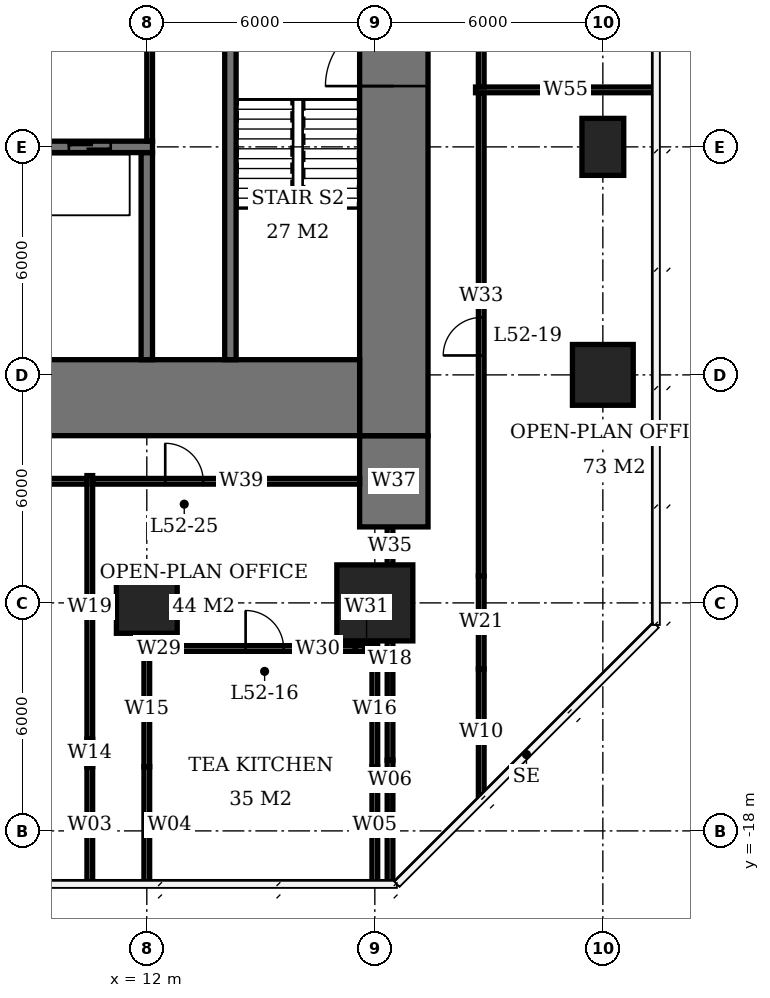
"""IFC4 building model, lengths in metres.
Left out: names, types, materials, properties, quantities, classifications, styles, units other than length and angle.
Written with IfcOpenShell. Run it as: python <this file> out.ifc"""

import sys

from ifc_helpers import new_model, si_unit, direction, frame, frame_2d, origin, origin_2d, place, context, subcontext, project, spatial, rectangle, extrude, element, fill, save


model = new_model("IFC4")
c1 = context("Model", 3, precision=1e-05, world=origin(), true_north=direction((0.0, 1.0)))
c2 = subcontext(c1, "Body", "Model", "MODEL_VIEW")
j1 = project(units=[si_unit("LENGTHUNIT", "METRE"), si_unit("PLANEANGLEUNIT", "RADIAN")], contexts=[c1])
p1 = place(None, origin())
s1 = spatial("IfcSite", under=j1, at=p1, CompositionType="ELEMENT")
p2 = place(p1, origin())
s2 = spatial("IfcBuilding", under=s1, at=p2, CompositionType="ELEMENT")
p3 = place(p2, frame((0.0, 0.0, 212.3)))
s3 = spatial("IfcBuildingStorey", under=s2, at=p3, CompositionType="ELEMENT", Elevation=212.3)
p4 = place(p3, frame((12.0, -12.0, 0.0), z_axis=(0.0, 0.0, 1.0), x_axis=(1.0, 0.0, 0.0)))
e1 = element("IfcColumn", 1, at=p4, inside=s3, PredefinedType="COLUMN", context=c2, shape_type="SweptSolid", body=[
    extrude(rectangle(XDim=1.6, YDim=1.6, at=origin_2d()), origin(), (0.0, 0.0, 1.0), 3.9),
])
p5 = place(p3, frame((18.0, -12.0, 0.0), z_axis=(0.0, 0.0, 1.0), x_axis=(1.0, 0.0, 0.0)))
e2 = element("IfcColumn", 2, at=p5, inside=s3, PredefinedType="COLUMN", context=c2, shape_type="SweptSolid", body=[
    extrude(rectangle(XDim=2.0, YDim=2.0, at=origin_2d()), origin(), (0.0, 0.0, 1.0), 3.9),
])
p6 = place(p3, frame((24.0, -6.0, 0.0), z_axis=(0.0, 0.0, 1.0), x_axis=(1.0, 0.0, 0.0)))
e3 = element("IfcColumn", 3, at=p6, inside=s3, PredefinedType="COLUMN", context=c2, shape_type="SweptSolid", body=[
    extrude(rectangle(XDim=1.6, YDim=1.6, at=origin_2d()), origin(), (0.0, 0.0, 1.0), 3.9),
])
p7 = place(p3, frame((24.0, 0.0, 0.0), z_axis=(0.0, 0.0, 1.0), x_axis=(0.0, 1.0, 0.0)))
e4 = element("IfcColumn", 4, at=p7, inside=s3, PredefinedType="COLUMN", context=c2, shape_type="SweptSolid", body=[
    extrude(rectangle(XDim=1.5, YDim=1.1, at=origin_2d()), origin(), (0.0, 0.0, 1.0), 3.9),
])
p8 = place(p3, frame((-5.6, -6.6, 0.0), z_axis=(0.0, 0.0, 1.0), x_axis=(1.0, 0.0, 0.0)))
e5 = element("IfcWall", 5, at=p8, inside=s3, PredefinedType="SHEAR", context=c2, shape_type="SweptSolid", body=[
    extrude(rectangle(XDim=23.2, YDim=2.0, at=frame_2d((11.6, 0.0))), origin(), (0.0, 0.0, 1.0), 3.9),
])
p9 = place(p3, frame((18.5, -7.6, 0.0), z_axis=(0.0, 0.0, 1.0), x_axis=(0.0, 1.0, 0.0)))
e6 = element("IfcWall", 6, at=p9, inside=s3, PredefinedType="SHEAR", context=c2, shape_type="SweptSolid", body=[
    extrude(rectangle(XDim=21.2, YDim=1.8, at=frame_2d((10.6, 0.0))), origin(), (0.0, 0.0, 1.0), 3.9),
])
p10 = place(p9, frame((9.2, 0.0, 0.0)))
e7 = element("IfcOpeningElement", 7, at=p10, cuts=e6, PredefinedType="OPENING", context=c2, shape_type="SweptSolid", body=[
    extrude(rectangle(XDim=1.8, YDim=2.4, at=frame_2d((0.9, 1.2))), frame((0.0, 0.91, 0.0), z_axis=(0.0, -1.0, 0.0), x_axis=(1.0, 0.0, 0.0)), (0.0, 0.0, 1.0), 1.82),
])
p11 = place(p3, frame((18.5, -10.0, 0.0), z_axis=(0.0, 0.0, 1.0), x_axis=(0.0, 1.0, 0.0)))
e8 = element("IfcWall", 8, at=p11, inside=s3, PredefinedType="SHEAR", context=c2, shape_type="SweptSolid", body=[
    extrude(rectangle(XDim=2.4, YDim=1.8, at=frame_2d((1.2, 0.0))), origin(), (0.0, 0.0, 1.0), 3.9),
])
p12 = place(p3, frame((-5.6, 0.0, 0.0), z_axis=(0.0, 0.0, 1.0), x_axis=(1.0, 0.0, 0.0)))
e9 = element("IfcWall", 9, at=p12, inside=s3, PredefinedType="SHEAR", context=c2, shape_type="SweptSolid", body=[
    extrude(rectangle(XDim=17.75, YDim=0.3, at=frame_2d((8.875, 0.0))), origin(), (0.0, 0.0, 1.0), 3.9),
])
p13 = place(p12, frame((0.6, 0.0, 0.0)))
e10 = element("IfcOpeningElement", 10, at=p13, cuts=e9, PredefinedType="OPENING", context=c2, shape_type="SweptSolid", body=[
    extrude(rectangle(XDim=0.9, YDim=2.1, at=frame_2d((0.45, 1.05))), frame((0.0, 0.16, 0.0), z_axis=(0.0, -1.0, 0.0), x_axis=(1.0, 0.0, 0.0)), (0.0, 0.0, 1.0), 0.32),
])
p14 = place(p12, frame((3.7, 0.0, 0.0)))
e11 = element("IfcOpeningElement", 11, at=p14, cuts=e9, PredefinedType="OPENING", context=c2, shape_type="SweptSolid", body=[
    extrude(rectangle(XDim=1.0, YDim=2.1, at=frame_2d((0.5, 1.05))), frame((0.0, 0.16, 0.0), z_axis=(0.0, -1.0, 0.0), x_axis=(1.0, 0.0, 0.0)), (0.0, 0.0, 1.0), 0.32),
])
p15 = place(p12, frame((9.6, 0.0, 0.0)))
e12 = element("IfcOpeningElement", 12, at=p15, cuts=e9, PredefinedType="OPENING", context=c2, shape_type="SweptSolid", body=[
    extrude(rectangle(XDim=1.0, YDim=2.1, at=frame_2d((0.5, 1.05))), frame((0.0, 0.16, 0.0), z_axis=(0.0, -1.0, 0.0), x_axis=(1.0, 0.0, 0.0)), (0.0, 0.0, 1.0), 0.32),
])
p16 = place(p12, frame((12.55, 0.0, 0.0)))
e13 = element("IfcOpeningElement", 13, at=p16, cuts=e9, PredefinedType="OPENING", context=c2, shape_type="SweptSolid", body=[
    extrude(rectangle(XDim=1.1, YDim=2.1, at=frame_2d((0.55, 1.05))), frame((0.0, 0.16, 0.0), z_axis=(0.0, -1.0, 0.0), x_axis=(1.0, 0.0, 0.0)), (0.0, 0.0, 1.0), 0.32),
])
p17 = place(p12, frame((15.55, 0.0, 0.0)))
e14 = element("IfcOpeningElement", 14, at=p17, cuts=e9, PredefinedType="OPENING", context=c2, shape_type="SweptSolid", body=[
    extrude(rectangle(XDim=1.1, YDim=2.1, at=frame_2d((0.55, 1.05))), frame((0.0, 0.16, 0.0), z_axis=(0.0, -1.0, 0.0), x_axis=(1.0, 0.0, 0.0)), (0.0, 0.0, 1.0), 0.32),
])
p18 = place(p3, frame((12.0, -5.6, 0.0), z_axis=(0.0, 0.0, 1.0), x_axis=(0.0, 1.0, 0.0)))
e15 = element("IfcWall", 15, at=p18, inside=s3, PredefinedType="SHEAR", context=c2, shape_type="SweptSolid", body=[
    extrude(rectangle(XDim=5.45, YDim=0.3, at=frame_2d((2.725, 0.0))), origin(), (0.0, 0.0, 1.0), 3.9),
])
p19 = place(p3, frame((14.2, -5.6, 0.0), z_axis=(0.0, 0.0, 1.0), x_axis=(0.0, 1.0, 0.0)))
e16 = element("IfcWall", 16, at=p19, inside=s3, PredefinedType="SHEAR", context=c2, shape_type="SweptSolid", body=[
    extrude(rectangle(XDim=8.45, YDim=0.3, at=frame_2d((4.225, 0.0))), origin(), (0.0, 0.0, 1.0), 3.9),
])
p20 = place(p3, frame((11.925, -13.2, 0.0), z_axis=(0.0, 0.0, 1.0), x_axis=(1.0, 0.0, 0.0)))
e17 = element("IfcWall", 17, at=p20, inside=s3, PredefinedType="PARTITIONING", context=c2, shape_type="SweptSolid", body=[
    extrude(rectangle(XDim=0.785, YDim=0.15, at=frame_2d((0.393, 0.0))), origin(), (0.0, 0.0, 1.0), 2.65),
])
p21 = place(p3, frame((12.71, -13.2, 0.0), z_axis=(0.0, 0.0, 1.0), x_axis=(1.0, 0.0, 0.0)))
e18 = element("IfcWall", 18, at=p21, inside=s3, PredefinedType="PARTITIONING", context=c2, shape_type="SweptSolid", body=[
    extrude(rectangle(XDim=4.78, YDim=0.15, at=frame_2d((2.39, 0.0))), origin(), (0.0, 0.0, 1.0), 3.65),
])
p22 = place(p21, frame((1.89, 0.0, 0.0)))
e19 = element("IfcOpeningElement", 19, at=p22, cuts=e18, PredefinedType="OPENING", context=c2, shape_type="SweptSolid", body=[
    extrude(rectangle(XDim=1.0, YDim=2.1, at=frame_2d((0.5, 1.05))), frame((0.0, 0.085, 0.0), z_axis=(0.0, -1.0, 0.0), x_axis=(1.0, 0.0, 0.0)), (0.0, 0.0, 1.0), 0.17),
])
p23 = place(p3, frame((17.49, -13.2, 0.0), z_axis=(0.0, 0.0, 1.0), x_axis=(1.0, 0.0, 0.0)))
e20 = element("IfcWall", 20, at=p23, inside=s3, PredefinedType="PARTITIONING", context=c2, shape_type="SweptSolid", body=[
    extrude(rectangle(XDim=0.585, YDim=0.15, at=frame_2d((0.292, 0.0))), origin(), (0.0, 0.0, 1.0), 2.65),
])
p24 = place(p3, frame((12.0, -19.4, 0.0), z_axis=(0.0, 0.0, 1.0), x_axis=(0.0, 1.0, 0.0)))
e21 = element("IfcWall", 21, at=p24, inside=s3, PredefinedType="PARTITIONING", context=c2, shape_type="SweptSolid", body=[
    extrude(rectangle(XDim=3.09, YDim=0.15, at=frame_2d((1.545, 0.0))), origin(), (0.0, 0.0, 1.0), 3.65),
])
p25 = place(p3, frame((12.0, -16.31, 0.0), z_axis=(0.0, 0.0, 1.0), x_axis=(0.0, 1.0, 0.0)))
e22 = element("IfcWall", 22, at=p25, inside=s3, PredefinedType="PARTITIONING", context=c2, shape_type="SweptSolid", body=[
    extrude(rectangle(XDim=3.035, YDim=0.15, at=frame_2d((1.518, 0.0))), origin(), (0.0, 0.0, 1.0), 2.65),
])
p26 = place(p3, frame((18.0, -19.4, 0.0), z_axis=(0.0, 0.0, 1.0), x_axis=(0.0, 1.0, 0.0)))
e23 = element("IfcWall", 23, at=p26, inside=s3, PredefinedType="PARTITIONING", context=c2, shape_type="SweptSolid", body=[
    extrude(rectangle(XDim=3.09, YDim=0.15, at=frame_2d((1.545, 0.0))), origin(), (0.0, 0.0, 1.0), 3.65),
])
p27 = place(p3, frame((18.0, -16.31, 0.0), z_axis=(0.0, 0.0, 1.0), x_axis=(0.0, 1.0, 0.0)))
e24 = element("IfcWall", 24, at=p27, inside=s3, PredefinedType="PARTITIONING", context=c2, shape_type="SweptSolid", body=[
    extrude(rectangle(XDim=3.035, YDim=0.15, at=frame_2d((1.518, 0.0))), origin(), (0.0, 0.0, 1.0), 2.65),
])
p28 = place(p3, frame((-5.6, -8.8, 0.0), z_axis=(0.0, 0.0, 1.0), x_axis=(1.0, 0.0, 0.0)))
e25 = element("IfcWall", 25, at=p28, inside=s3, PredefinedType="PARTITIONING", context=c2, shape_type="SweptSolid", body=[
    extrude(rectangle(XDim=16.025, YDim=0.15, at=frame_2d((8.013, 0.0))), origin(), (0.0, 0.0, 1.0), 3.65),
])
p29 = place(p28, frame((5.135, 0.0, 0.0)))
e26 = element("IfcOpeningElement", 26, at=p29, cuts=e25, PredefinedType="OPENING", context=c2, shape_type="SweptSolid", body=[
    extrude(rectangle(XDim=1.0, YDim=2.1, at=frame_2d((0.5, 1.05))), frame((0.0, 0.085, 0.0), z_axis=(0.0, -1.0, 0.0), x_axis=(1.0, 0.0, 0.0)), (0.0, 0.0, 1.0), 0.17),
])
p30 = place(p3, frame((10.5, -19.4, 0.0), z_axis=(0.0, 0.0, 1.0), x_axis=(0.0, 1.0, 0.0)))
e27 = element("IfcWall", 27, at=p30, inside=s3, PredefinedType="PARTITIONING", context=c2, shape_type="SweptSolid", body=[
    extrude(rectangle(XDim=3.09, YDim=0.15, at=frame_2d((1.545, 0.0))), origin(), (0.0, 0.0, 1.0), 3.65),
])
p31 = place(p3, frame((10.5, -16.31, 0.0), z_axis=(0.0, 0.0, 1.0), x_axis=(0.0, 1.0, 0.0)))
e28 = element("IfcWall", 28, at=p31, inside=s3, PredefinedType="PARTITIONING", context=c2, shape_type="SweptSolid", body=[
    extrude(rectangle(XDim=0.72, YDim=0.15, at=frame_2d((0.36, 0.0))), origin(), (0.0, 0.0, 1.0), 2.65),
])
p32 = place(p3, frame((10.5, -15.59, 0.0), z_axis=(0.0, 0.0, 1.0), x_axis=(0.0, 1.0, 0.0)))
e29 = element("IfcWall", 29, at=p32, inside=s3, PredefinedType="PARTITIONING", context=c2, shape_type="SweptSolid", body=[
    extrude(rectangle(XDim=6.94, YDim=0.15, at=frame_2d((3.47, 0.0))), origin(), (0.0, 0.0, 1.0), 3.65),
])
p33 = place(p3, frame((10.575, -8.8, 0.0), z_axis=(0.0, 0.0, 1.0), x_axis=(1.0, 0.0, 0.0)))
e30 = element("IfcWall", 30, at=p33, inside=s3, PredefinedType="PARTITIONING", context=c2, shape_type="SweptSolid", body=[
    extrude(rectangle(XDim=7.025, YDim=0.15, at=frame_2d((3.513, 0.0))), origin(), (0.0, 0.0, 1.0), 3.65),
])
p34 = place(p33, frame((1.91, 0.0, 0.0)))
e31 = element("IfcOpeningElement", 31, at=p34, cuts=e30, PredefinedType="OPENING", context=c2, shape_type="SweptSolid", body=[
    extrude(rectangle(XDim=1.0, YDim=2.1, at=frame_2d((0.5, 1.05))), frame((0.0, 0.085, 0.0), z_axis=(0.0, -1.0, 0.0), x_axis=(1.0, 0.0, 0.0)), (0.0, 0.0, 1.0), 0.17),
])
p35 = place(p3, frame((18.4, -19.4, 0.0), z_axis=(0.0, 0.0, 1.0), x_axis=(0.0, 1.0, 0.0)))
e32 = element("IfcWall", 32, at=p35, inside=s3, PredefinedType="PARTITIONING", context=c2, shape_type="SweptSolid", body=[
    extrude(rectangle(XDim=3.26, YDim=0.15, at=frame_2d((1.63, 0.0))), origin(), (0.0, 0.0, 1.0), 3.65),
])
p36 = place(p3, frame((18.4, -16.14, 0.0), z_axis=(0.0, 0.0, 1.0), x_axis=(0.0, 1.0, 0.0)))
e33 = element("IfcWall", 33, at=p36, inside=s3, PredefinedType="PARTITIONING", context=c2, shape_type="SweptSolid", body=[
    extrude(rectangle(XDim=3.14, YDim=0.15, at=frame_2d((1.57, 0.0))), origin(), (0.0, 0.0, 1.0), 2.65),
])
p37 = place(p3, frame((18.4, -11.0, 0.0), z_axis=(0.0, 0.0, 1.0), x_axis=(0.0, 1.0, 0.0)))
e34 = element("IfcWall", 34, at=p37, inside=s3, PredefinedType="PARTITIONING", context=c2, shape_type="SweptSolid", body=[
    extrude(rectangle(XDim=1.0, YDim=0.15, at=frame_2d((0.5, 0.0))), origin(), (0.0, 0.0, 1.0), 3.65),
])
p38 = place(p3, frame((20.8, -17.064, 0.0), z_axis=(0.0, 0.0, 1.0), x_axis=(0.0, 1.0, 0.0)))
e35 = element("IfcWall", 35, at=p38, inside=s3, PredefinedType="PARTITIONING", context=c2, shape_type="SweptSolid", body=[
    extrude(rectangle(XDim=3.324, YDim=0.15, at=frame_2d((1.662, 0.0))), origin(), (0.0, 0.0, 1.0), 3.65),
])
p39 = place(p3, frame((20.8, -13.74, 0.0), z_axis=(0.0, 0.0, 1.0), x_axis=(0.0, 1.0, 0.0)))
e36 = element("IfcWall", 36, at=p39, inside=s3, PredefinedType="PARTITIONING", context=c2, shape_type="SweptSolid", body=[
    extrude(rectangle(XDim=2.45, YDim=0.15, at=frame_2d((1.225, 0.0))), origin(), (0.0, 0.0, 1.0), 2.65),
])
p40 = place(p3, frame((20.8, -11.29, 0.0), z_axis=(0.0, 0.0, 1.0), x_axis=(0.0, 1.0, 0.0)))
e37 = element("IfcWall", 37, at=p40, inside=s3, PredefinedType="PARTITIONING", context=c2, shape_type="SweptSolid", body=[
    extrude(rectangle(XDim=12.715, YDim=0.15, at=frame_2d((6.357, 0.0))), origin(), (0.0, 0.0, 1.0), 3.65),
])
p41 = place(p40, frame((5.801, 0.0, 0.0)))
e38 = element("IfcOpeningElement", 38, at=p41, cuts=e37, PredefinedType="OPENING", context=c2, shape_type="SweptSolid", body=[
    extrude(rectangle(XDim=1.0, YDim=2.1, at=frame_2d((0.5, 1.05))), frame((0.0, 0.085, 0.0), z_axis=(0.0, -1.0, 0.0), x_axis=(1.0, 0.0, 0.0)), (0.0, 0.0, 1.0), 0.17),
])
p42 = place(p3, frame((20.8, 1.575, 0.0), z_axis=(0.0, 0.0, 1.0), x_axis=(0.0, 1.0, 0.0)))
e39 = element("IfcWall", 39, at=p42, inside=s3, PredefinedType="PARTITIONING", context=c2, shape_type="SweptSolid", body=[
    extrude(rectangle(XDim=21.489, YDim=0.15, at=frame_2d((10.745, 0.0))), origin(), (0.0, 0.0, 1.0), 3.65),
])
p43 = place(p42, frame((13.425, 0.0, 0.0)))
e40 = element("IfcOpeningElement", 40, at=p43, cuts=e39, PredefinedType="OPENING", context=c2, shape_type="SweptSolid", body=[
    extrude(rectangle(XDim=1.0, YDim=2.1, at=frame_2d((0.5, 1.05))), frame((0.0, 0.085, 0.0), z_axis=(0.0, -1.0, 0.0), x_axis=(1.0, 0.0, 0.0)), (0.0, 0.0, 1.0), 0.17),
])
p44 = place(p3, frame((20.65, 1.5, 0.0), z_axis=(0.0, 0.0, 1.0), x_axis=(1.0, 0.0, 0.0)))
e41 = element("IfcWall", 41, at=p44, inside=s3, PredefinedType="PARTITIONING", context=c2, shape_type="SweptSolid", body=[
    extrude(rectangle(XDim=4.75, YDim=0.15, at=frame_2d((2.375, 0.0))), origin(), (0.0, 0.0, 1.0), 3.65),
])
p45 = place(p3, frame((12.075, 0.15, 0.0), z_axis=(0.0, 0.0, 1.0), x_axis=(0.0, 1.0, 0.0)))
e42 = element("IfcWall", 42, at=p45, inside=s3, PredefinedType="PARTITIONING", context=c2, shape_type="SweptSolid", body=[
    extrude(rectangle(XDim=3.0, YDim=0.15, at=frame_2d((1.5, 0.0))), origin(), (0.0, 0.0, 1.0), 3.65),
])
p46 = place(p10, origin())
e43 = element("IfcDoor", 43, at=p46, inside=s3, OperationType="DOUBLE_DOOR_SINGLE_SWING", PredefinedType="DOOR", context=c2, shape_type="SweptSolid", body=[
    extrude(rectangle(XDim=1.8, YDim=2.4, at=frame_2d((0.9, 1.2))), frame((0.0, 0.025, 0.0), z_axis=(0.0, -1.0, 0.0), x_axis=(1.0, 0.0, 0.0)), (0.0, 0.0, 1.0), 0.05),
])
fill(e7, e43)
p47 = place(p17, origin())
e44 = element("IfcDoor", 44, at=p47, inside=s3, OperationType="DOUBLE_DOOR_SLIDING", PredefinedType="USERDEFINED", context=c2, shape_type="SweptSolid", body=[
    extrude(rectangle(XDim=1.1, YDim=2.1, at=frame_2d((0.55, 1.05))), frame((0.0, 0.025, 0.0), z_axis=(0.0, -1.0, 0.0), x_axis=(1.0, 0.0, 0.0)), (0.0, 0.0, 1.0), 0.05),
])
fill(e14, e44)
p48 = place(p22, origin())
e45 = element("IfcDoor", 45, at=p48, inside=s3, OperationType="SINGLE_SWING_LEFT", PredefinedType="DOOR", context=c2, shape_type="SweptSolid", body=[
    extrude(rectangle(XDim=1.0, YDim=2.1, at=frame_2d((0.5, 1.05))), frame((0.0, 0.025, 0.0), z_axis=(0.0, -1.0, 0.0), x_axis=(1.0, 0.0, 0.0)), (0.0, 0.0, 1.0), 0.05),
])
fill(e19, e45)
p49 = place(p41, origin())
e46 = element("IfcDoor", 46, at=p49, inside=s3, OperationType="SINGLE_SWING_LEFT", PredefinedType="DOOR", context=c2, shape_type="SweptSolid", body=[
    extrude(rectangle(XDim=1.0, YDim=2.1, at=frame_2d((0.5, 1.05))), frame((0.0, 0.025, 0.0), z_axis=(0.0, -1.0, 0.0), x_axis=(1.0, 0.0, 0.0)), (0.0, 0.0, 1.0), 0.05),
])
fill(e38, e46)
p50 = place(p34, origin())
e47 = element("IfcDoor", 47, at=p50, inside=s3, OperationType="SINGLE_SWING_LEFT", PredefinedType="DOOR", context=c2, shape_type="SweptSolid", body=[
    extrude(rectangle(XDim=1.0, YDim=2.1, at=frame_2d((0.5, 1.05))), frame((0.0, 0.025, 0.0), z_axis=(0.0, -1.0, 0.0), x_axis=(1.0, 0.0, 0.0)), (0.0, 0.0, 1.0), 0.05),
])
fill(e31, e47)
save(model, sys.argv[1])
